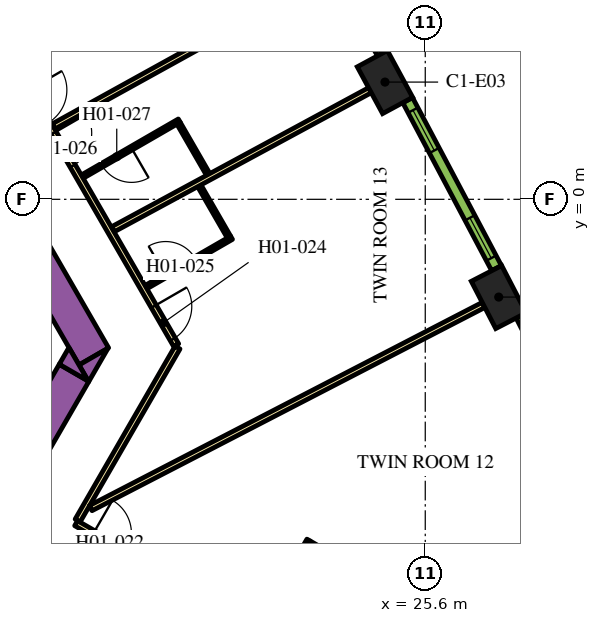
"""IFC4 building model, lengths in metres.
Left out: names, types, materials, properties, quantities, classifications, styles, units other than length and angle.
Written with IfcOpenShell. Run it as: python <this file> out.ifc"""

import sys

from ifc_helpers import new_model, si_unit, direction, frame, frame_2d, origin, origin_2d, place, context, subcontext, project, spatial, polyline, rectangle, outline, extrude, element, fill, save


model = new_model("IFC4")
c1 = context("Model", 3, precision=1e-05, world=origin(), true_north=direction((0.0, 1.0)))
c2 = subcontext(c1, "Body", "Model", "MODEL_VIEW")
j1 = project(units=[si_unit("LENGTHUNIT", "METRE"), si_unit("PLANEANGLEUNIT", "RADIAN")], contexts=[c1])
p1 = place(None, origin())
s1 = spatial("IfcSite", under=j1, at=p1, CompositionType="ELEMENT")
p2 = place(p1, origin())
s2 = spatial("IfcBuilding", under=s1, at=p2, CompositionType="ELEMENT")
p3 = place(p2, frame((0.0, 0.0, 27.6)))
s3 = spatial("IfcBuildingStorey", under=s2, at=p3, CompositionType="ELEMENT", Elevation=27.6)
for number, where, z_axis, x_axis in (
    (1, (27.533, -2.572, 0.0), (0.0, 0.0, 1.0), (-0.459, 0.888, 0.0)),
    (2, (24.54, 3.085, 0.0), (0.0, 0.0, 1.0), (-0.476, 0.88, 0.0)),
):
    element("IfcColumn", number, at=place(p3, frame(where, z_axis=z_axis, x_axis=x_axis)), inside=s3, PredefinedType="COLUMN", context=c2, shape_type="SweptSolid", body=[
        extrude(rectangle(XDim=1.4, YDim=0.9, at=origin_2d()), origin(), (0.0, 0.0, 1.0), 3.9),
    ])
p4 = place(p3, frame((6.776, 13.364, 0.0), z_axis=(0.0, 0.0, 1.0), x_axis=(0.500004177138, -0.8660229921, 0.0)))
e3 = element("IfcWall", 3, at=p4, inside=s3, PredefinedType="SOLIDWALL", context=c2, shape_type="SweptSolid", body=[
    extrude(rectangle(XDim=20.204, YDim=0.9, at=frame_2d((10.102, 0.0))), origin(), (0.0, 0.0, 1.0), 3.9),
])
p5 = place(p3, origin())
e4 = element("IfcWall", 4, at=p5, inside=s3, PredefinedType="SOLIDWALL", context=c2, shape_type="SweptSolid", body=[
    extrude(outline(polyline([(16.743, -4.8), (16.489, -4.36), (17.251, -3.92), (16.743, -4.8)])), origin(), (0.0, 0.0, 1.0), 3.9),
])
p6 = place(p3, frame((11.695, -12.644, 0.0), z_axis=(0.0, 0.0, 1.0), x_axis=(0.500010229568, 0.86601949766, 0.0)))
e5 = element("IfcWall", 5, at=p6, inside=s3, PredefinedType="SOLIDWALL", context=c2, shape_type="SweptSolid", body=[
    extrude(rectangle(XDim=9.326, YDim=0.9, at=frame_2d((4.663, 0.0))), origin(), (0.0, 0.0, 1.0), 3.9),
])
e6 = element("IfcWall", 6, at=p5, inside=s3, PredefinedType="SOLIDWALL", context=c2, shape_type="SweptSolid", body=[
    extrude(outline(polyline([(16.223, -3.9), (16.732, -4.78), (15.969, -4.34), (16.223, -3.9)])), origin(), (0.0, 0.0, 1.0), 3.9),
])
p7 = place(p3, frame((16.412, -8.523, 0.0), z_axis=(0.0, 0.0, 1.0), x_axis=(0.866022197818, -0.500005552856, 0.0)))
e7 = element("IfcWall", 7, at=p7, inside=s3, PredefinedType="PARTITIONING", context=c2, shape_type="SweptSolid", body=[
    extrude(rectangle(XDim=16.224, YDim=0.15, at=frame_2d((8.112, 0.0))), origin(), (0.0, 0.0, 1.0), 2.75),
])
p8 = place(p7, frame((7.949, 0.0, 0.0)))
e8 = element("IfcOpeningElement", 8, at=p8, cuts=e7, PredefinedType="OPENING", context=c2, shape_type="SweptSolid", body=[
    extrude(rectangle(XDim=1.0, YDim=2.1, at=frame_2d((0.5, 1.05))), frame((0.0, 0.085, 0.0), z_axis=(0.0, -1.0, 0.0), x_axis=(1.0, 0.0, 0.0)), (0.0, 0.0, 1.0), 0.17),
])
p9 = place(p7, frame((0.526, 0.0, 0.0)))
e9 = element("IfcOpeningElement", 9, at=p9, cuts=e7, PredefinedType="OPENING", context=c2, shape_type="SweptSolid", body=[
    extrude(rectangle(XDim=1.0, YDim=2.1, at=frame_2d((0.5, 1.05))), frame((0.0, 0.085, 0.0), z_axis=(0.0, -1.0, 0.0), x_axis=(1.0, 0.0, 0.0)), (0.0, 0.0, 1.0), 0.17),
])
p10 = place(p3, frame((19.081, -3.9, 0.0), z_axis=(0.0, 0.0, 1.0), x_axis=(-0.499974327079, -0.866040225545, 0.0)))
e10 = element("IfcWall", 10, at=p10, inside=s3, PredefinedType="PARTITIONING", context=c2, shape_type="SweptSolid", body=[
    extrude(rectangle(XDim=5.258, YDim=0.15, at=frame_2d((2.629, 0.0))), origin(), (0.0, 0.0, 1.0), 2.75),
])
p11 = place(p3, frame((6.163, 18.475, 0.0), z_axis=(0.0, 0.0, 1.0), x_axis=(0.500001317485, -0.866024643133, 0.0)))
e11 = element("IfcWall", 11, at=p11, inside=s3, PredefinedType="PARTITIONING", context=c2, shape_type="SweptSolid", body=[
    extrude(rectangle(XDim=25.767, YDim=0.15, at=frame_2d((12.883, 0.0))), origin(), (0.0, 0.0, 1.0), 2.75),
])
p12 = place(p11, frame((24.586, 0.0, 0.0)))
e12 = element("IfcOpeningElement", 12, at=p12, cuts=e11, PredefinedType="OPENING", context=c2, shape_type="SweptSolid", body=[
    extrude(rectangle(XDim=1.0, YDim=2.1, at=frame_2d((0.5, 1.05))), frame((0.0, 0.085, 0.0), z_axis=(0.0, -1.0, 0.0), x_axis=(1.0, 0.0, 0.0)), (0.0, 0.0, 1.0), 0.17),
])
p13 = place(p11, frame((19.319, 0.0, 0.0)))
e13 = element("IfcOpeningElement", 13, at=p13, cuts=e11, PredefinedType="OPENING", context=c2, shape_type="SweptSolid", body=[
    extrude(rectangle(XDim=1.0, YDim=2.1, at=frame_2d((0.5, 1.05))), frame((0.0, 0.085, 0.0), z_axis=(0.0, -1.0, 0.0), x_axis=(1.0, 0.0, 0.0)), (0.0, 0.0, 1.0), 0.17),
])
p14 = place(p11, frame((18.012, 0.0, 0.0)))
e14 = element("IfcOpeningElement", 14, at=p14, cuts=e11, PredefinedType="OPENING", context=c2, shape_type="SweptSolid", body=[
    extrude(rectangle(XDim=1.0, YDim=2.1, at=frame_2d((0.5, 1.05))), frame((0.0, 0.085, 0.0), z_axis=(0.0, -1.0, 0.0), x_axis=(1.0, 0.0, 0.0)), (0.0, 0.0, 1.0), 0.17),
])
p15 = place(p11, frame((6.824, 0.0, 0.0)))
e15 = element("IfcOpeningElement", 15, at=p15, cuts=e11, PredefinedType="OPENING", context=c2, shape_type="SweptSolid", body=[
    extrude(rectangle(XDim=1.1, YDim=2.1, at=frame_2d((0.55, 1.05))), frame((0.0, 0.085, 0.0), z_axis=(0.0, -1.0, 0.0), x_axis=(1.0, 0.0, 0.0)), (0.0, 0.0, 1.0), 0.17),
])
p16 = place(p11, frame((4.658, 0.0, 0.0)))
e16 = element("IfcOpeningElement", 16, at=p16, cuts=e11, PredefinedType="OPENING", context=c2, shape_type="SweptSolid", body=[
    extrude(rectangle(XDim=0.9, YDim=2.1, at=frame_2d((0.45, 1.05))), frame((0.0, 0.085, 0.0), z_axis=(0.0, -1.0, 0.0), x_axis=(1.0, 0.0, 0.0)), (0.0, 0.0, 1.0), 0.17),
])
p17 = place(p11, frame((0.18, 0.0, 0.0)))
e17 = element("IfcOpeningElement", 17, at=p17, cuts=e11, PredefinedType="OPENING", context=c2, shape_type="SweptSolid", body=[
    extrude(rectangle(XDim=1.0, YDim=2.1, at=frame_2d((0.5, 1.05))), frame((0.0, 0.085, 0.0), z_axis=(0.0, -1.0, 0.0), x_axis=(1.0, 0.0, 0.0)), (0.0, 0.0, 1.0), 0.17),
])
p18 = place(p3, frame((23.132, 5.962, 0.0), z_axis=(0.0, 0.0, 1.0), x_axis=(-0.875121716713, -0.483902863121, 0.0)))
e18 = element("IfcWall", 18, at=p18, inside=s3, PredefinedType="PARTITIONING", context=c2, shape_type="SweptSolid", body=[
    extrude(rectangle(XDim=8.355, YDim=0.15, at=frame_2d((4.178, 0.0))), origin(), (0.0, 0.0, 1.0), 2.75),
])
p19 = place(p3, frame((27.134, -2.779, 0.0), z_axis=(0.0, 0.0, 1.0), x_axis=(-0.8882049501, -0.459447457951, 0.0)))
e19 = element("IfcWall", 19, at=p19, inside=s3, PredefinedType="PARTITIONING", context=c2, shape_type="SweptSolid", body=[
    extrude(rectangle(XDim=11.638, YDim=0.15, at=frame_2d((5.819, 0.0))), origin(), (0.0, 0.0, 1.0), 2.75),
])
p20 = place(p3, frame((24.145, 2.871, 0.0), z_axis=(0.0, 0.0, 1.0), x_axis=(-0.879551725039, -0.475803281809, 0.0)))
e20 = element("IfcWall", 20, at=p20, inside=s3, PredefinedType="PARTITIONING", context=c2, shape_type="SweptSolid", body=[
    extrude(rectangle(XDim=7.688, YDim=0.15, at=frame_2d((3.844, 0.0))), origin(), (0.0, 0.0, 1.0), 2.75),
])
p21 = place(p3, frame((30.018, -8.483, 0.0), z_axis=(0.0, 0.0, 1.0), x_axis=(-0.896544505264, -0.44295366584, 0.0)))
e21 = element("IfcWall", 21, at=p21, inside=s3, PredefinedType="PARTITIONING", context=c2, shape_type="SweptSolid", body=[
    extrude(rectangle(XDim=8.079, YDim=0.15, at=frame_2d((4.04, 0.0))), origin(), (0.0, 0.0, 1.0), 2.75),
])
p22 = place(p3, frame((22.53, -8.966, 0.0), z_axis=(0.0, 0.0, 1.0), x_axis=(-0.500006934395, -0.866021400173, 0.0)))
e22 = element("IfcWall", 22, at=p22, inside=s3, PredefinedType="PARTITIONING", context=c2, shape_type="SweptSolid", body=[
    extrude(rectangle(XDim=2.6, YDim=0.1, at=frame_2d((1.3, 0.0))), origin(), (0.0, 0.0, 1.0), 2.75),
])
p23 = place(p22, frame((1.1, 0.0, 0.0)))
e23 = element("IfcOpeningElement", 23, at=p23, cuts=e22, PredefinedType="OPENING", context=c2, shape_type="SweptSolid", body=[
    extrude(rectangle(XDim=0.9, YDim=2.1, at=frame_2d((0.45, 1.05))), frame((0.0, 0.06, 0.0), z_axis=(0.0, -1.0, 0.0), x_axis=(1.0, 0.0, 0.0)), (0.0, 0.0, 1.0), 0.12),
])
p24 = place(p3, frame((22.549, -9.035, 0.0), z_axis=(0.0, 0.0, 1.0), x_axis=(0.86605165483, -0.499954529098, 0.0)))
e24 = element("IfcWall", 24, at=p24, inside=s3, PredefinedType="PARTITIONING", context=c2, shape_type="SweptSolid", body=[
    extrude(rectangle(XDim=1.7, YDim=0.1, at=frame_2d((0.85, 0.0))), origin(), (0.0, 0.0, 1.0), 2.75),
])
p25 = place(p3, frame((18.25, -2.311, 0.0), z_axis=(0.0, 0.0, 1.0), x_axis=(0.866021400173, 0.500006934395, 0.0)))
e25 = element("IfcWall", 25, at=p25, inside=s3, PredefinedType="PARTITIONING", context=c2, shape_type="SweptSolid", body=[
    extrude(rectangle(XDim=2.6, YDim=0.1, at=frame_2d((1.3, 0.0))), origin(), (0.0, 0.0, 1.0), 2.75),
])
p26 = place(p25, frame((0.6, 0.0, 0.0)))
e26 = element("IfcOpeningElement", 26, at=p26, cuts=e25, PredefinedType="OPENING", context=c2, shape_type="SweptSolid", body=[
    extrude(rectangle(XDim=0.9, YDim=2.1, at=frame_2d((0.45, 1.05))), frame((0.0, 0.06, 0.0), z_axis=(0.0, -1.0, 0.0), x_axis=(1.0, 0.0, 0.0)), (0.0, 0.0, 1.0), 0.12),
])
p27 = place(p3, frame((20.434, -0.993, 0.0), z_axis=(0.0, 0.0, 1.0), x_axis=(-0.500086022567, 0.865975732936, 0.0)))
e27 = element("IfcWall", 27, at=p27, inside=s3, PredefinedType="PARTITIONING", context=c2, shape_type="SweptSolid", body=[
    extrude(rectangle(XDim=1.55, YDim=0.1, at=frame_2d((0.775, 0.0))), origin(), (0.0, 0.0, 1.0), 2.75),
])
p28 = place(p3, frame((19.127, 2.071, 0.0), z_axis=(0.0, 0.0, 1.0), x_axis=(-0.866003658127, -0.500037662692, 0.0)))
e28 = element("IfcWall", 28, at=p28, inside=s3, PredefinedType="PARTITIONING", context=c2, shape_type="SweptSolid", body=[
    extrude(rectangle(XDim=2.95, YDim=0.1, at=frame_2d((1.475, 0.0))), origin(), (0.0, 0.0, 1.0), 2.75),
])
p29 = place(p28, frame((1.45, 0.0, 0.0)))
e29 = element("IfcOpeningElement", 29, at=p29, cuts=e28, PredefinedType="OPENING", context=c2, shape_type="SweptSolid", body=[
    extrude(rectangle(XDim=0.9, YDim=2.1, at=frame_2d((0.45, 1.05))), frame((0.0, 0.06, 0.0), z_axis=(0.0, -1.0, 0.0), x_axis=(1.0, 0.0, 0.0)), (0.0, 0.0, 1.0), 0.12),
])
p30 = place(p3, frame((19.109, 2.002, 0.0), z_axis=(0.0, 0.0, 1.0), x_axis=(0.500086022567, -0.865975732936, 0.0)))
e30 = element("IfcWall", 30, at=p30, inside=s3, PredefinedType="PARTITIONING", context=c2, shape_type="SweptSolid", body=[
    extrude(rectangle(XDim=1.55, YDim=0.1, at=frame_2d((0.775, 0.0))), origin(), (0.0, 0.0, 1.0), 2.75),
])
p31 = place(p3, frame((30.377, -7.521, 0.0), z_axis=(0.0, 0.0, 1.0), x_axis=(-0.451233929645, 0.892405704115, 0.0)))
e31 = element("IfcWall", 31, at=p31, inside=s3, PredefinedType="SOLIDWALL", context=c2, shape_type="SweptSolid", body=[
    extrude(rectangle(XDim=4.998, YDim=0.29, at=frame_2d((2.499, 0.0))), origin(), (0.0, 0.0, 1.0), 3.65),
])
p32 = place(p31, frame((0.297, 0.0, 0.9)))
e32 = element("IfcOpeningElement", 32, at=p32, cuts=e31, PredefinedType="OPENING", context=c2, shape_type="SweptSolid", body=[
    extrude(rectangle(XDim=1.2, YDim=2.15, at=frame_2d((0.6, 1.075))), frame((0.0, 0.155, 0.0), z_axis=(0.0, -1.0, 0.0), x_axis=(1.0, 0.0, 0.0)), (0.0, 0.0, 1.0), 0.31),
])
p33 = place(p31, frame((3.501, 0.0, 0.9)))
e33 = element("IfcOpeningElement", 33, at=p33, cuts=e31, PredefinedType="OPENING", context=c2, shape_type="SweptSolid", body=[
    extrude(rectangle(XDim=1.2, YDim=2.15, at=frame_2d((0.6, 1.075))), frame((0.0, 0.155, 0.0), z_axis=(0.0, -1.0, 0.0), x_axis=(1.0, 0.0, 0.0)), (0.0, 0.0, 1.0), 0.31),
])
p34 = place(p3, frame((27.475, -1.81, 0.0), z_axis=(0.0, 0.0, 1.0), x_axis=(-0.467629620899, 0.883924509026, 0.0)))
e34 = element("IfcWall", 34, at=p34, inside=s3, PredefinedType="SOLIDWALL", context=c2, shape_type="SweptSolid", body=[
    extrude(rectangle(XDim=4.998, YDim=0.29, at=frame_2d((2.499, 0.0))), origin(), (0.0, 0.0, 1.0), 3.65),
])
p35 = place(p34, frame((0.297, 0.0, 0.9)))
e35 = element("IfcOpeningElement", 35, at=p35, cuts=e34, PredefinedType="OPENING", context=c2, shape_type="SweptSolid", body=[
    extrude(rectangle(XDim=1.2, YDim=2.15, at=frame_2d((0.6, 1.075))), frame((0.0, 0.155, 0.0), z_axis=(0.0, -1.0, 0.0), x_axis=(1.0, 0.0, 0.0)), (0.0, 0.0, 1.0), 0.31),
])
p36 = place(p34, frame((3.501, 0.0, 0.9)))
e36 = element("IfcOpeningElement", 36, at=p36, cuts=e34, PredefinedType="OPENING", context=c2, shape_type="SweptSolid", body=[
    extrude(rectangle(XDim=1.2, YDim=2.15, at=frame_2d((0.6, 1.075))), frame((0.0, 0.155, 0.0), z_axis=(0.0, -1.0, 0.0), x_axis=(1.0, 0.0, 0.0)), (0.0, 0.0, 1.0), 0.31),
])
p37 = place(p3, frame((24.468, 3.846, 0.0), z_axis=(0.0, 0.0, 1.0), x_axis=(-0.483912572871, 0.875116347589, 0.0)))
e37 = element("IfcWall", 37, at=p37, inside=s3, PredefinedType="SOLIDWALL", context=c2, shape_type="SweptSolid", body=[
    extrude(rectangle(XDim=4.998, YDim=0.29, at=frame_2d((2.499, 0.0))), origin(), (0.0, 0.0, 1.0), 3.65),
])
p38 = place(p37, frame((0.297, 0.0, 0.9)))
e38 = element("IfcOpeningElement", 38, at=p38, cuts=e37, PredefinedType="OPENING", context=c2, shape_type="SweptSolid", body=[
    extrude(rectangle(XDim=1.2, YDim=2.15, at=frame_2d((0.6, 1.075))), frame((0.0, 0.155, 0.0), z_axis=(0.0, -1.0, 0.0), x_axis=(1.0, 0.0, 0.0)), (0.0, 0.0, 1.0), 0.31),
])
p39 = place(p37, frame((3.501, 0.0, 0.9)))
e39 = element("IfcOpeningElement", 39, at=p39, cuts=e37, PredefinedType="OPENING", context=c2, shape_type="SweptSolid", body=[
    extrude(rectangle(XDim=1.2, YDim=2.15, at=frame_2d((0.6, 1.075))), frame((0.0, 0.155, 0.0), z_axis=(0.0, -1.0, 0.0), x_axis=(1.0, 0.0, 0.0)), (0.0, 0.0, 1.0), 0.31),
])
p40 = place(p9, origin())
e40 = element("IfcDoor", 40, at=p40, inside=s3, OperationType="SINGLE_SWING_LEFT", PredefinedType="DOOR", context=c2, shape_type="SweptSolid", body=[
    extrude(rectangle(XDim=1.0, YDim=2.1, at=frame_2d((0.5, 1.05))), frame((0.0, 0.025, 0.0), z_axis=(0.0, -1.0, 0.0), x_axis=(1.0, 0.0, 0.0)), (0.0, 0.0, 1.0), 0.05),
])
fill(e9, e40)
p41 = place(p12, origin())
e41 = element("IfcDoor", 41, at=p41, inside=s3, OperationType="SINGLE_SWING_RIGHT", PredefinedType="DOOR", context=c2, shape_type="SweptSolid", body=[
    extrude(rectangle(XDim=1.0, YDim=2.1, at=frame_2d((0.5, 1.05))), frame((0.0, 0.025, 0.0), z_axis=(0.0, -1.0, 0.0), x_axis=(1.0, 0.0, 0.0)), (0.0, 0.0, 1.0), 0.05),
])
fill(e12, e41)
p42 = place(p26, origin())
e42 = element("IfcDoor", 42, at=p42, inside=s3, OperationType="SINGLE_SWING_LEFT", PredefinedType="DOOR", context=c2, shape_type="SweptSolid", body=[
    extrude(rectangle(XDim=0.9, YDim=2.1, at=frame_2d((0.45, 1.05))), frame((0.0, 0.025, 0.0), z_axis=(0.0, -1.0, 0.0), x_axis=(1.0, 0.0, 0.0)), (0.0, 0.0, 1.0), 0.05),
])
fill(e26, e42)
p43 = place(p13, origin())
e43 = element("IfcDoor", 43, at=p43, inside=s3, OperationType="SINGLE_SWING_LEFT", PredefinedType="DOOR", context=c2, shape_type="SweptSolid", body=[
    extrude(rectangle(XDim=1.0, YDim=2.1, at=frame_2d((0.5, 1.05))), frame((0.0, 0.025, 0.0), z_axis=(0.0, -1.0, 0.0), x_axis=(1.0, 0.0, 0.0)), (0.0, 0.0, 1.0), 0.05),
])
fill(e13, e43)
p44 = place(p29, origin())
e44 = element("IfcDoor", 44, at=p44, inside=s3, OperationType="SINGLE_SWING_LEFT", PredefinedType="DOOR", context=c2, shape_type="SweptSolid", body=[
    extrude(rectangle(XDim=0.9, YDim=2.1, at=frame_2d((0.45, 1.05))), frame((0.0, 0.025, 0.0), z_axis=(0.0, -1.0, 0.0), x_axis=(1.0, 0.0, 0.0)), (0.0, 0.0, 1.0), 0.05),
])
fill(e29, e44)
p45 = place(p35, origin())
e45 = element("IfcWindow", 45, at=p45, inside=s3, PartitioningType="DOUBLE_PANEL_VERTICAL", PredefinedType="WINDOW", context=c2, shape_type="SweptSolid", body=[
    extrude(rectangle(XDim=1.2, YDim=2.15, at=frame_2d((0.6, 1.075))), frame((0.0, 0.015, 0.0), z_axis=(0.0, -1.0, 0.0), x_axis=(1.0, 0.0, 0.0)), (0.0, 0.0, 1.0), 0.06),
])
fill(e35, e45)
p46 = place(p36, origin())
e46 = element("IfcWindow", 46, at=p46, inside=s3, PartitioningType="DOUBLE_PANEL_VERTICAL", PredefinedType="WINDOW", context=c2, shape_type="SweptSolid", body=[
    extrude(rectangle(XDim=1.2, YDim=2.15, at=frame_2d((0.6, 1.075))), frame((0.0, 0.015, 0.0), z_axis=(0.0, -1.0, 0.0), x_axis=(1.0, 0.0, 0.0)), (0.0, 0.0, 1.0), 0.06),
])
fill(e36, e46)
save(model, sys.argv[1])
